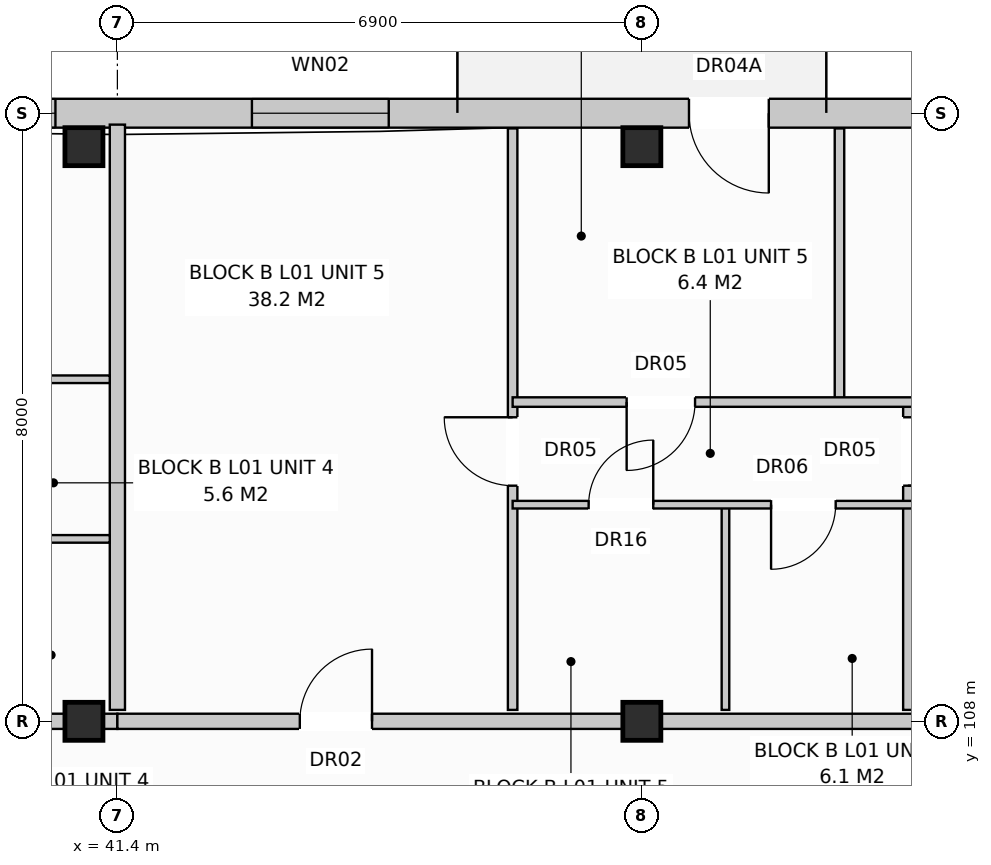
"""IFC4 building model, lengths in metres.
Left out: names, types, materials, properties, quantities, classifications, styles, units other than length and angle.
Written with IfcOpenShell. Run it as: python <this file> out.ifc"""

import sys

from ifc_helpers import new_model, si_unit, direction, frame, frame_2d, origin, origin_with_axes, origin_2d, place, context, subcontext, project, spatial, rectangle, extrude, element, fill, save


model = new_model("IFC4")
c1 = context("Model", 3, precision=1e-05, world=origin(), true_north=direction((0.0, 1.0)))
c2 = subcontext(c1, "Body", "Model", "MODEL_VIEW")
j1 = project(units=[si_unit("LENGTHUNIT", "METRE"), si_unit("PLANEANGLEUNIT", "RADIAN")], contexts=[c1])
p1 = place(None, origin())
s1 = spatial("IfcSite", under=j1, at=p1, CompositionType="ELEMENT")
p2 = place(p1, origin())
s2 = spatial("IfcBuilding", under=s1, at=p2, CompositionType="ELEMENT")
p3 = place(p2, frame((0.0, 0.0, 4.4)))
s3 = spatial("IfcBuildingStorey", under=s2, at=p3, CompositionType="ELEMENT", Elevation=4.4)
for number, where, z_axis, x_axis in (
    (1, (40.96, 108.0, 0.0), (0.0, 0.0, 1.0), (1.0, 0.0, 0.0)),
    (2, (40.96, 115.56, 0.0), (0.0, 0.0, 1.0), (1.0, 0.0, 0.0)),
    (3, (48.3, 108.0, 0.0), (0.0, 0.0, 1.0), (1.0, 0.0, 0.0)),
    (4, (48.3, 115.56, 0.0), (0.0, 0.0, 1.0), (1.0, 0.0, 0.0)),
):
    element("IfcColumn", number, at=place(p3, frame(where, z_axis=z_axis, x_axis=x_axis)), inside=s3, PredefinedType="COLUMN", context=c2, shape_type="SweptSolid", body=[
        extrude(rectangle(XDim=0.5, YDim=0.5, at=origin_2d()), origin(), (0.0, 0.0, 1.0), 3.6),
    ])
p4 = place(p3, frame((0.18, 116.0, 0.0), z_axis=(0.0, 0.0, 1.0), x_axis=(1.0, 0.0, 0.0)))
e5 = element("IfcWall", 5, at=p4, inside=s3, PredefinedType="STANDARD", context=c2, shape_type="SweptSolid", body=[
    extrude(rectangle(XDim=54.84, YDim=0.38, at=frame_2d((27.42, 0.0))), origin(), (0.0, 0.0, 1.0), 3.33),
])
p5 = place(p4, frame((7.34, 0.0, 0.0)))
e6 = element("IfcOpeningElement", 6, at=p5, cuts=e5, PredefinedType="OPENING", context=c2, shape_type="SweptSolid", body=[
    extrude(rectangle(XDim=1.05, YDim=2.12, at=frame_2d((0.525, 1.06))), frame((0.0, 0.202, 0.0), z_axis=(0.0, -1.0, 0.0), x_axis=(1.0, 0.0, 0.0)), (0.0, 0.0, 1.0), 0.404),
])
p6 = place(p4, frame((18.851, 0.0, 0.0)))
e7 = element("IfcOpeningElement", 7, at=p6, cuts=e5, PredefinedType="OPENING", context=c2, shape_type="SweptSolid", body=[
    extrude(rectangle(XDim=1.05, YDim=2.12, at=frame_2d((0.525, 1.06))), frame((0.0, 0.202, 0.0), z_axis=(0.0, -1.0, 0.0), x_axis=(1.0, 0.0, 0.0)), (0.0, 0.0, 1.0), 0.404),
])
p7 = place(p4, frame((32.651, 0.0, 0.0)))
e8 = element("IfcOpeningElement", 8, at=p7, cuts=e5, PredefinedType="OPENING", context=c2, shape_type="SweptSolid", body=[
    extrude(rectangle(XDim=1.05, YDim=2.12, at=frame_2d((0.525, 1.06))), frame((0.0, 0.202, 0.0), z_axis=(0.0, -1.0, 0.0), x_axis=(1.0, 0.0, 0.0)), (0.0, 0.0, 1.0), 0.404),
])
p8 = place(p4, frame((48.74, 0.0, 0.0)))
e9 = element("IfcOpeningElement", 9, at=p8, cuts=e5, PredefinedType="OPENING", context=c2, shape_type="SweptSolid", body=[
    extrude(rectangle(XDim=1.05, YDim=2.12, at=frame_2d((0.525, 1.06))), frame((0.0, 0.202, 0.0), z_axis=(0.0, -1.0, 0.0), x_axis=(1.0, 0.0, 0.0)), (0.0, 0.0, 1.0), 0.404),
])
p9 = place(p4, frame((1.54, 0.0, 0.8)))
e10 = element("IfcOpeningElement", 10, at=p9, cuts=e5, PredefinedType="OPENING", context=c2, shape_type="SweptSolid", body=[
    extrude(rectangle(XDim=1.9, YDim=1.85, at=frame_2d((0.95, 0.925))), frame((0.0, 0.202, 0.0), z_axis=(0.0, -1.0, 0.0), x_axis=(1.0, 0.0, 0.0)), (0.0, 0.0, 1.0), 0.404),
])
p10 = place(p4, frame((10.415, 0.0, 0.8)))
e11 = element("IfcOpeningElement", 11, at=p10, cuts=e5, PredefinedType="OPENING", context=c2, shape_type="SweptSolid", body=[
    extrude(rectangle(XDim=1.95, YDim=1.65, at=frame_2d((0.975, 0.825))), frame((0.0, 0.202, 0.0), z_axis=(0.0, -1.0, 0.0), x_axis=(1.0, 0.0, 0.0)), (0.0, 0.0, 1.0), 0.404),
])
p11 = place(p4, frame((14.89, 0.0, 0.8)))
e12 = element("IfcOpeningElement", 12, at=p11, cuts=e5, PredefinedType="OPENING", context=c2, shape_type="SweptSolid", body=[
    extrude(rectangle(XDim=1.8, YDim=1.7, at=frame_2d((0.9, 0.85))), frame((0.0, 0.202, 0.0), z_axis=(0.0, -1.0, 0.0), x_axis=(1.0, 0.0, 0.0)), (0.0, 0.0, 1.0), 0.404),
])
p12 = place(p4, frame((21.09, 0.0, 0.9)))
e13 = element("IfcOpeningElement", 13, at=p12, cuts=e5, PredefinedType="OPENING", context=c2, shape_type="SweptSolid", body=[
    extrude(rectangle(XDim=0.95, YDim=1.55, at=frame_2d((0.475, 0.775))), frame((0.0, 0.202, 0.0), z_axis=(0.0, -1.0, 0.0), x_axis=(1.0, 0.0, 0.0)), (0.0, 0.0, 1.0), 0.404),
])
p13 = place(p4, frame((23.815, 0.0, 0.8)))
e14 = element("IfcOpeningElement", 14, at=p13, cuts=e5, PredefinedType="OPENING", context=c2, shape_type="SweptSolid", body=[
    extrude(rectangle(XDim=1.95, YDim=1.65, at=frame_2d((0.975, 0.825))), frame((0.0, 0.202, 0.0), z_axis=(0.0, -1.0, 0.0), x_axis=(1.0, 0.0, 0.0)), (0.0, 0.0, 1.0), 0.404),
])
p14 = place(p4, frame((28.49, 0.0, 0.8)))
e15 = element("IfcOpeningElement", 15, at=p14, cuts=e5, PredefinedType="OPENING", context=c2, shape_type="SweptSolid", body=[
    extrude(rectangle(XDim=1.8, YDim=1.7, at=frame_2d((0.9, 0.85))), frame((0.0, 0.202, 0.0), z_axis=(0.0, -1.0, 0.0), x_axis=(1.0, 0.0, 0.0)), (0.0, 0.0, 1.0), 0.404),
])
p15 = place(p4, frame((35.34, 0.0, 0.8)))
e16 = element("IfcOpeningElement", 16, at=p15, cuts=e5, PredefinedType="OPENING", context=c2, shape_type="SweptSolid", body=[
    extrude(rectangle(XDim=1.9, YDim=1.85, at=frame_2d((0.95, 0.925))), frame((0.0, 0.202, 0.0), z_axis=(0.0, -1.0, 0.0), x_axis=(1.0, 0.0, 0.0)), (0.0, 0.0, 1.0), 0.404),
])
p16 = place(p4, frame((38.455, 0.0, 0.8)))
e17 = element("IfcOpeningElement", 17, at=p16, cuts=e5, PredefinedType="OPENING", context=c2, shape_type="SweptSolid", body=[
    extrude(rectangle(XDim=1.95, YDim=1.65, at=frame_2d((0.975, 0.825))), frame((0.0, 0.202, 0.0), z_axis=(0.0, -1.0, 0.0), x_axis=(1.0, 0.0, 0.0)), (0.0, 0.0, 1.0), 0.404),
])
p17 = place(p4, frame((42.99, 0.0, 0.8)))
e18 = element("IfcOpeningElement", 18, at=p17, cuts=e5, PredefinedType="OPENING", context=c2, shape_type="SweptSolid", body=[
    extrude(rectangle(XDim=1.8, YDim=1.7, at=frame_2d((0.9, 0.85))), frame((0.0, 0.202, 0.0), z_axis=(0.0, -1.0, 0.0), x_axis=(1.0, 0.0, 0.0)), (0.0, 0.0, 1.0), 0.404),
])
p18 = place(p4, frame((51.84, 0.0, 0.8)))
e19 = element("IfcOpeningElement", 19, at=p18, cuts=e5, PredefinedType="OPENING", context=c2, shape_type="SweptSolid", body=[
    extrude(rectangle(XDim=1.9, YDim=1.85, at=frame_2d((0.95, 0.925))), frame((0.0, 0.202, 0.0), z_axis=(0.0, -1.0, 0.0), x_axis=(1.0, 0.0, 0.0)), (0.0, 0.0, 1.0), 0.404),
])
p19 = place(p3, frame((41.4, 108.15, 0.0), z_axis=(0.0, 0.0, 1.0), x_axis=(0.0, 1.0, 0.0)))
e20 = element("IfcWall", 20, at=p19, inside=s3, PredefinedType="PARTITIONING", context=c2, shape_type="SweptSolid", body=[
    extrude(rectangle(XDim=7.7, YDim=0.2, at=frame_2d((3.85, 0.0))), origin(), (0.0, 0.0, 1.0), 3.33),
])
p20 = place(p3, frame((34.5, 108.0, 0.0), z_axis=(0.0, 0.0, 1.0), x_axis=(1.0, 0.0, 0.0)))
e21 = element("IfcWall", 21, at=p20, inside=s3, PredefinedType="PARTITIONING", context=c2, shape_type="SweptSolid", body=[
    extrude(rectangle(XDim=6.9, YDim=0.2, at=frame_2d((3.45, 0.0))), origin(), (0.0, 0.0, 1.0), 2.77),
])
p21 = place(p20, frame((2.0, 0.0, 0.0)))
e22 = element("IfcOpeningElement", 22, at=p21, cuts=e21, PredefinedType="OPENING", context=c2, shape_type="SweptSolid", body=[
    extrude(rectangle(XDim=0.95, YDim=2.15, at=frame_2d((0.475, 1.075))), frame((0.0, 0.112, 0.0), z_axis=(0.0, -1.0, 0.0), x_axis=(1.0, 0.0, 0.0)), (0.0, 0.0, 1.0), 0.224),
])
for number, where, z_axis, x_axis in (
    (23, (38.4, 110.4, 0.0), (0.0, 0.0, 1.0), (1.0, 0.0, 0.0)),
    (24, (38.4, 112.5, 0.0), (0.0, 0.0, 1.0), (1.0, 0.0, 0.0)),
):
    element("IfcWall", number, at=place(p3, frame(where, z_axis=z_axis, x_axis=x_axis)), inside=s3, PredefinedType="PARTITIONING", context=c2, shape_type="SweptSolid", body=[
        extrude(rectangle(XDim=2.9, YDim=0.1, at=frame_2d((1.45, 0.0))), origin(), (0.0, 0.0, 1.0), 3.33),
    ])
p22 = place(p3, frame((41.4, 108.0, 0.0), z_axis=(0.0, 0.0, 1.0), x_axis=(1.0, 0.0, 0.0)))
e25 = element("IfcWall", 25, at=p22, inside=s3, PredefinedType="PARTITIONING", context=c2, shape_type="SweptSolid", body=[
    extrude(rectangle(XDim=13.8, YDim=0.2, at=frame_2d((6.9, 0.0))), origin(), (0.0, 0.0, 1.0), 2.77),
])
p23 = place(p22, frame((2.4, 0.0, 0.0)))
e26 = element("IfcOpeningElement", 26, at=p23, cuts=e25, PredefinedType="OPENING", context=c2, shape_type="SweptSolid", body=[
    extrude(rectangle(XDim=0.95, YDim=2.15, at=frame_2d((0.475, 1.075))), frame((0.0, 0.112, 0.0), z_axis=(0.0, -1.0, 0.0), x_axis=(1.0, 0.0, 0.0)), (0.0, 0.0, 1.0), 0.224),
])
p24 = place(p3, frame((46.6, 108.15, 0.0), z_axis=(0.0, 0.0, 1.0), x_axis=(0.0, 1.0, 0.0)))
e27 = element("IfcWall", 27, at=p24, inside=s3, PredefinedType="PARTITIONING", context=c2, shape_type="SweptSolid", body=[
    extrude(rectangle(XDim=7.65, YDim=0.125, at=frame_2d((3.825, 0.0))), origin(), (0.0, 0.0, 1.0), 3.33),
])
p25 = place(p24, frame((2.95, 0.0, 0.0)))
e28 = element("IfcOpeningElement", 28, at=p25, cuts=e27, PredefinedType="OPENING", context=c2, shape_type="SweptSolid", body=[
    extrude(rectangle(XDim=0.9, YDim=2.1, at=frame_2d((0.45, 1.05))), frame((0.0, 0.074, 0.0), z_axis=(0.0, -1.0, 0.0), x_axis=(1.0, 0.0, 0.0)), (0.0, 0.0, 1.0), 0.149),
])
p26 = place(p3, frame((49.4, 108.15, 0.0), z_axis=(0.0, 0.0, 1.0), x_axis=(0.0, 1.0, 0.0)))
e29 = element("IfcWall", 29, at=p26, inside=s3, PredefinedType="PARTITIONING", context=c2, shape_type="SweptSolid", body=[
    extrude(rectangle(XDim=2.7, YDim=0.1, at=frame_2d((1.35, 0.0))), origin(), (0.0, 0.0, 1.0), 3.33),
])
p27 = place(p3, frame((51.8, 108.15, 0.0), z_axis=(0.0, 0.0, 1.0), x_axis=(0.0, 1.0, 0.0)))
e30 = element("IfcWall", 30, at=p27, inside=s3, PredefinedType="PARTITIONING", context=c2, shape_type="SweptSolid", body=[
    extrude(rectangle(XDim=4.05, YDim=0.125, at=frame_2d((2.025, 0.0))), origin(), (0.0, 0.0, 1.0), 2.99),
])
p28 = place(p27, frame((2.95, 0.0, 0.0)))
e31 = element("IfcOpeningElement", 31, at=p28, cuts=e30, PredefinedType="OPENING", context=c2, shape_type="SweptSolid", body=[
    extrude(rectangle(XDim=0.9, YDim=2.1, at=frame_2d((0.45, 1.05))), frame((0.0, 0.074, 0.0), z_axis=(0.0, -1.0, 0.0), x_axis=(1.0, 0.0, 0.0)), (0.0, 0.0, 1.0), 0.149),
])
p29 = place(p3, frame((50.9, 112.2, 0.0), z_axis=(0.0, 0.0, 1.0), x_axis=(0.0, 1.0, 0.0)))
e32 = element("IfcWall", 32, at=p29, inside=s3, PredefinedType="PARTITIONING", context=c2, shape_type="SweptSolid", body=[
    extrude(rectangle(XDim=3.6, YDim=0.125, at=frame_2d((1.8, 0.0))), origin(), (0.0, 0.0, 1.0), 3.33),
])
p30 = place(p3, frame((46.6, 110.85, 0.0), z_axis=(0.0, 0.0, 1.0), x_axis=(1.0, 0.0, 0.0)))
e33 = element("IfcWall", 33, at=p30, inside=s3, PredefinedType="PARTITIONING", context=c2, shape_type="SweptSolid", body=[
    extrude(rectangle(XDim=8.5, YDim=0.1, at=frame_2d((4.25, 0.0))), origin(), (0.0, 0.0, 1.0), 3.33),
])
p31 = place(p30, frame((1.0, 0.0, 0.0)))
e34 = element("IfcOpeningElement", 34, at=p31, cuts=e33, PredefinedType="OPENING", context=c2, shape_type="SweptSolid", body=[
    extrude(rectangle(XDim=0.85, YDim=2.1, at=frame_2d((0.425, 1.05))), frame((0.0, 0.062, 0.0), z_axis=(0.0, -1.0, 0.0), x_axis=(1.0, 0.0, 0.0)), (0.0, 0.0, 1.0), 0.124),
])
p32 = place(p30, frame((3.4, 0.0, 0.0)))
e35 = element("IfcOpeningElement", 35, at=p32, cuts=e33, PredefinedType="OPENING", context=c2, shape_type="SweptSolid", body=[
    extrude(rectangle(XDim=0.85, YDim=2.05, at=frame_2d((0.425, 1.025))), frame((0.0, 0.062, 0.0), z_axis=(0.0, -1.0, 0.0), x_axis=(1.0, 0.0, 0.0)), (0.0, 0.0, 1.0), 0.124),
])
p33 = place(p30, frame((6.2, 0.0, 0.0)))
e36 = element("IfcOpeningElement", 36, at=p33, cuts=e33, PredefinedType="OPENING", context=c2, shape_type="SweptSolid", body=[
    extrude(rectangle(XDim=0.85, YDim=2.05, at=frame_2d((0.425, 1.025))), frame((0.0, 0.062, 0.0), z_axis=(0.0, -1.0, 0.0), x_axis=(1.0, 0.0, 0.0)), (0.0, 0.0, 1.0), 0.124),
])
p34 = place(p3, frame((46.6, 112.2, 0.0), z_axis=(0.0, 0.0, 1.0), x_axis=(1.0, 0.0, 0.0)))
e37 = element("IfcWall", 37, at=p34, inside=s3, PredefinedType="PARTITIONING", context=c2, shape_type="SweptSolid", body=[
    extrude(rectangle(XDim=8.5, YDim=0.125, at=frame_2d((4.25, 0.0))), origin(), (0.0, 0.0, 1.0), 3.33),
])
p35 = place(p34, frame((1.5, 0.0, 0.0)))
e38 = element("IfcOpeningElement", 38, at=p35, cuts=e37, PredefinedType="OPENING", context=c2, shape_type="SweptSolid", body=[
    extrude(rectangle(XDim=0.9, YDim=2.1, at=frame_2d((0.45, 1.05))), frame((0.0, 0.074, 0.0), z_axis=(0.0, -1.0, 0.0), x_axis=(1.0, 0.0, 0.0)), (0.0, 0.0, 1.0), 0.149),
])
p36 = place(p34, frame((5.6, 0.0, 0.0)))
e39 = element("IfcOpeningElement", 39, at=p36, cuts=e37, PredefinedType="OPENING", context=c2, shape_type="SweptSolid", body=[
    extrude(rectangle(XDim=0.9, YDim=2.1, at=frame_2d((0.45, 1.05))), frame((0.0, 0.074, 0.0), z_axis=(0.0, -1.0, 0.0), x_axis=(1.0, 0.0, 0.0)), (0.0, 0.0, 1.0), 0.149),
])
p37 = place(p8, frame((1.05, 0.0, 0.0), z_axis=(0.0, 0.0, 1.0), x_axis=(-1.0, 0.0, 0.0)))
e40 = element("IfcDoor", 40, at=p37, inside=s3, OperationType="SINGLE_SWING_RIGHT", PredefinedType="DOOR", context=c2, shape_type="SweptSolid", body=[
    extrude(rectangle(XDim=1.05, YDim=2.12, at=frame_2d((0.525, 1.06))), frame((0.0, 0.025, 0.0), z_axis=(0.0, -1.0, 0.0), x_axis=(1.0, 0.0, 0.0)), (0.0, 0.0, 1.0), 0.05),
])
fill(e9, e40)
p38 = place(p16, origin_with_axes())
e41 = element("IfcWindow", 41, at=p38, inside=s3, PartitioningType="SINGLE_PANEL", PredefinedType="WINDOW", context=c2, shape_type="SweptSolid", body=[
    extrude(rectangle(XDim=1.95, YDim=1.65, at=frame_2d((0.975, 0.825))), frame((0.0, 0.03, 0.0), z_axis=(0.0, -1.0, 0.0), x_axis=(1.0, 0.0, 0.0)), (0.0, 0.0, 1.0), 0.06),
])
fill(e17, e41)
p39 = place(p17, origin_with_axes())
e42 = element("IfcWindow", 42, at=p39, inside=s3, PartitioningType="SINGLE_PANEL", PredefinedType="WINDOW", context=c2, shape_type="SweptSolid", body=[
    extrude(rectangle(XDim=1.8, YDim=1.7, at=frame_2d((0.9, 0.85))), frame((0.0, 0.03, 0.0), z_axis=(0.0, -1.0, 0.0), x_axis=(1.0, 0.0, 0.0)), (0.0, 0.0, 1.0), 0.06),
])
fill(e18, e42)
p40 = place(p23, origin_with_axes())
e43 = element("IfcDoor", 43, at=p40, inside=s3, OperationType="SINGLE_SWING_RIGHT", PredefinedType="DOOR", context=c2, shape_type="SweptSolid", body=[
    extrude(rectangle(XDim=0.95, YDim=2.15, at=frame_2d((0.475, 1.075))), frame((0.0, 0.025, 0.0), z_axis=(0.0, -1.0, 0.0), x_axis=(1.0, 0.0, 0.0)), (0.0, 0.0, 1.0), 0.05),
])
fill(e26, e43)
p41 = place(p25, origin_with_axes())
e44 = element("IfcDoor", 44, at=p41, inside=s3, OperationType="SINGLE_SWING_RIGHT", PredefinedType="DOOR", context=c2, shape_type="SweptSolid", body=[
    extrude(rectangle(XDim=0.9, YDim=2.1, at=frame_2d((0.45, 1.05))), frame((0.0, 0.025, 0.0), z_axis=(0.0, -1.0, 0.0), x_axis=(1.0, 0.0, 0.0)), (0.0, 0.0, 1.0), 0.05),
])
fill(e28, e44)
p42 = place(p28, frame((0.9, 0.0, 0.0), z_axis=(0.0, 0.0, 1.0), x_axis=(-1.0, 0.0, 0.0)))
e45 = element("IfcDoor", 45, at=p42, inside=s3, OperationType="SINGLE_SWING_LEFT", PredefinedType="DOOR", context=c2, shape_type="SweptSolid", body=[
    extrude(rectangle(XDim=0.9, YDim=2.1, at=frame_2d((0.45, 1.05))), frame((0.0, 0.025, 0.0), z_axis=(0.0, -1.0, 0.0), x_axis=(1.0, 0.0, 0.0)), (0.0, 0.0, 1.0), 0.05),
])
fill(e31, e45)
p43 = place(p31, origin_with_axes())
e46 = element("IfcDoor", 46, at=p43, inside=s3, OperationType="SINGLE_SWING_RIGHT", PredefinedType="DOOR", context=c2, shape_type="SweptSolid", body=[
    extrude(rectangle(XDim=0.85, YDim=2.1, at=frame_2d((0.425, 1.05))), frame((0.0, 0.025, 0.0), z_axis=(0.0, -1.0, 0.0), x_axis=(1.0, 0.0, 0.0)), (0.0, 0.0, 1.0), 0.05),
])
fill(e34, e46)
p44 = place(p32, frame((0.85, 0.0, 0.0), z_axis=(0.0, 0.0, 1.0), x_axis=(-1.0, 0.0, 0.0)))
e47 = element("IfcDoor", 47, at=p44, inside=s3, OperationType="SINGLE_SWING_LEFT", PredefinedType="DOOR", context=c2, shape_type="SweptSolid", body=[
    extrude(rectangle(XDim=0.85, YDim=2.05, at=frame_2d((0.425, 1.025))), frame((0.0, 0.025, 0.0), z_axis=(0.0, -1.0, 0.0), x_axis=(1.0, 0.0, 0.0)), (0.0, 0.0, 1.0), 0.05),
])
fill(e35, e47)
p45 = place(p35, frame((0.9, 0.0, 0.0), z_axis=(0.0, 0.0, 1.0), x_axis=(-1.0, 0.0, 0.0)))
e48 = element("IfcDoor", 48, at=p45, inside=s3, OperationType="SINGLE_SWING_LEFT", PredefinedType="DOOR", context=c2, shape_type="SweptSolid", body=[
    extrude(rectangle(XDim=0.9, YDim=2.1, at=frame_2d((0.45, 1.05))), frame((0.0, 0.025, 0.0), z_axis=(0.0, -1.0, 0.0), x_axis=(1.0, 0.0, 0.0)), (0.0, 0.0, 1.0), 0.05),
])
fill(e38, e48)
save(model, sys.argv[1])
